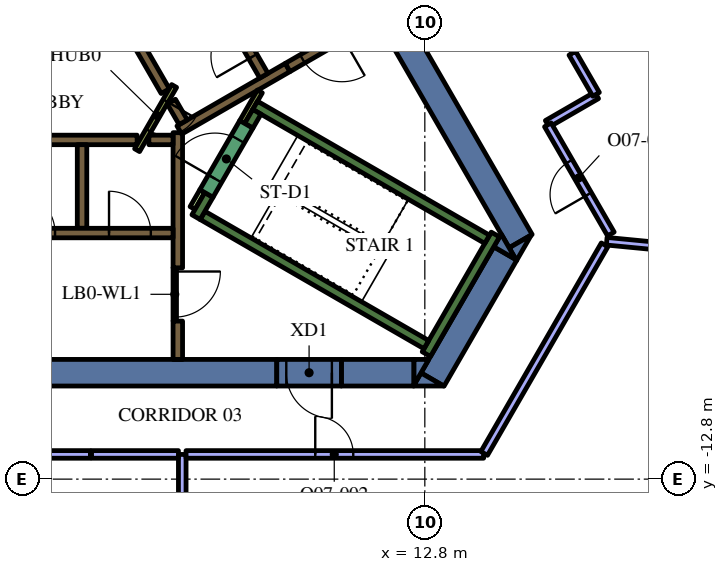
"""IFC4 building model, lengths in metres.
Left out: names, types, materials, properties, quantities, classifications, styles, units other than length and angle.
Written with IfcOpenShell. Run it as: python <this file> out.ifc"""

import sys

from ifc_helpers import new_model, si_unit, direction, frame, frame_2d, origin, place, context, subcontext, project, spatial, polyline, rectangle, outline, extrude, element, fill, save


model = new_model("IFC4")
c1 = context("Model", 3, precision=1e-05, world=origin(), true_north=direction((0.0, 1.0)))
c2 = subcontext(c1, "Body", "Model", "MODEL_VIEW")
j1 = project(units=[si_unit("LENGTHUNIT", "METRE"), si_unit("PLANEANGLEUNIT", "RADIAN")], contexts=[c1])
p1 = place(None, origin())
s1 = spatial("IfcSite", under=j1, at=p1, CompositionType="ELEMENT")
p2 = place(p1, origin())
s2 = spatial("IfcBuilding", under=s1, at=p2, CompositionType="ELEMENT")
p3 = place(p2, frame((0.0, 0.0, 218.4)))
s3 = spatial("IfcBuildingStorey", under=s2, at=p3, CompositionType="ELEMENT", Elevation=218.4)
p4 = place(p3, frame((9.085, 4.264, 0.0), z_axis=(0.0, 0.0, 1.0), x_axis=(0.499998082512, -0.866026510844, 0.0)))
e1 = element("IfcWall", 1, at=p4, inside=s3, PredefinedType="SOLIDWALL", context=c2, shape_type="SweptSolid", body=[
    extrude(rectangle(XDim=12.472, YDim=0.7, at=frame_2d((6.236, 0.0))), origin(), (0.0, 0.0, 1.0), 4.2),
])
p5 = place(p3, origin())
e2 = element("IfcWall", 2, at=p5, inside=s3, PredefinedType="SOLIDWALL", context=c2, shape_type="SweptSolid", body=[
    extrude(outline(polyline([(15.213, -7.05), (15.019, -6.714), (15.601, -6.378), (15.213, -7.05)])), origin(), (0.0, 0.0, 1.0), 4.2),
])
p6 = place(p3, frame((13.003, -10.179, 0.0), z_axis=(0.0, 0.0, 1.0), x_axis=(0.499972675833, 0.866041178825, 0.0)))
e3 = element("IfcWall", 3, at=p6, inside=s3, PredefinedType="SOLIDWALL", context=c2, shape_type="SweptSolid", body=[
    extrude(rectangle(XDim=3.829, YDim=0.7, at=frame_2d((1.915, 0.0))), origin(), (0.0, 0.0, 1.0), 4.2),
])
e4 = element("IfcWall", 4, at=p5, inside=s3, PredefinedType="SOLIDWALL", context=c2, shape_type="SweptSolid", body=[
    extrude(outline(polyline([(12.698, -10.005), (13.296, -10.35), (12.5, -10.35), (12.698, -10.005)])), origin(), (0.0, 0.0, 1.0), 4.2),
])
e5 = element("IfcWall", 5, at=p5, inside=s3, PredefinedType="SOLIDWALL", context=c2, shape_type="SweptSolid", body=[
    extrude(outline(polyline([(14.809, -6.35), (15.197, -7.022), (14.615, -6.686), (14.809, -6.35)])), origin(), (0.0, 0.0, 1.0), 4.2),
])
p7 = place(p3, frame((10.604, -10.0, 0.0), z_axis=(0.0, 0.0, 1.0), x_axis=(1.0, 0.0, 0.0)))
e6 = element("IfcWall", 6, at=p7, inside=s3, PredefinedType="SOLIDWALL", context=c2, shape_type="SweptSolid", body=[
    extrude(rectangle(XDim=1.909, YDim=0.7, at=frame_2d((0.955, 0.0))), origin(), (0.0, 0.0, 1.0), 4.2),
])
e7 = element("IfcWall", 7, at=p5, inside=s3, PredefinedType="SOLIDWALL", context=c2, shape_type="SweptSolid", body=[
    extrude(outline(polyline([(12.904, -9.65), (12.516, -10.322), (12.516, -9.65), (12.904, -9.65)])), origin(), (0.0, 0.0, 1.0), 4.2),
])
p8 = place(p3, frame((8.904, -10.0, 0.0), z_axis=(0.0, 0.0, 1.0), x_axis=(-1.0, 0.0, 0.0)))
e8 = element("IfcWall", 8, at=p8, inside=s3, PredefinedType="SOLIDWALL", context=c2, shape_type="SweptSolid", body=[
    extrude(rectangle(XDim=22.226, YDim=0.7, at=frame_2d((11.113, 0.0))), origin(), (0.0, 0.0, 1.0), 4.2),
])
p9 = place(p3, frame((12.84, -9.511, 0.0), z_axis=(0.0, 0.0, 1.0), x_axis=(0.500048121057, 0.865997619297, 0.0)))
e9 = element("IfcWall", 9, at=p9, inside=s3, PredefinedType="SOLIDWALL", context=c2, shape_type="SweptSolid", body=[
    extrude(rectangle(XDim=3.634, YDim=0.25, at=frame_2d((1.817, 0.0))), origin(), (0.0, 0.0, 1.0), 4.2),
])
p10 = place(p3, frame((12.84, -9.261, 0.0), z_axis=(0.0, 0.0, 1.0), x_axis=(-0.866013990052, 0.500019768644, 0.0)))
e10 = element("IfcWall", 10, at=p10, inside=s3, PredefinedType="SOLIDWALL", context=c2, shape_type="SweptSolid", body=[
    extrude(rectangle(XDim=6.8, YDim=0.25, at=frame_2d((3.4, 0.0))), origin(), (0.0, 0.0, 1.0), 4.2),
])
p11 = place(p3, frame((6.78, -5.906, 0.0), z_axis=(0.0, 0.0, 1.0), x_axis=(0.500223362819, 0.865896406789, 0.0)))
e11 = element("IfcWall", 11, at=p11, inside=s3, PredefinedType="SOLIDWALL", context=c2, shape_type="SweptSolid", body=[
    extrude(rectangle(XDim=0.675, YDim=0.25, at=frame_2d((0.337, 0.0))), origin(), (0.0, 0.0, 1.0), 4.2),
])
p12 = place(p3, frame((8.334, -2.964, 0.0), z_axis=(0.0, 0.0, 1.0), x_axis=(0.866016039709, -0.500016218704, 0.0)))
e12 = element("IfcWall", 12, at=p12, inside=s3, PredefinedType="SOLIDWALL", context=c2, shape_type="SweptSolid", body=[
    extrude(rectangle(XDim=7.05, YDim=0.25, at=frame_2d((3.525, 0.0))), origin(), (0.0, 0.0, 1.0), 4.2),
])
p13 = place(p3, frame((8.168, -3.503, 0.0), z_axis=(0.0, 0.0, 1.0), x_axis=(0.49972245349, 0.866185586049, 0.0)))
e13 = element("IfcWall", 13, at=p13, inside=s3, PredefinedType="SOLIDWALL", context=c2, shape_type="SweptSolid", body=[
    extrude(rectangle(XDim=0.425, YDim=0.25, at=frame_2d((0.212, 0.0))), origin(), (0.0, 0.0, 1.0), 4.2),
])
p14 = place(p3, frame((-5.259, -3.875, 0.0), z_axis=(0.0, 0.0, 1.0), x_axis=(1.0, 0.0, 0.0)))
e14 = element("IfcWall", 14, at=p14, inside=s3, PredefinedType="SOLIDWALL", context=c2, shape_type="SweptSolid", body=[
    extrude(rectangle(XDim=10.489, YDim=0.25, at=frame_2d((5.244, 0.0))), origin(), (0.0, 0.0, 1.0), 4.2),
])
p15 = place(p3, frame((3.78, -4.0, 0.0), z_axis=(0.0, 0.0, 1.0), x_axis=(0.0, -1.0, 0.0)))
e15 = element("IfcWall", 15, at=p15, inside=s3, PredefinedType="SOLIDWALL", context=c2, shape_type="SweptSolid", body=[
    extrude(rectangle(XDim=2.2, YDim=0.25, at=frame_2d((1.1, 0.0))), origin(), (0.0, 0.0, 1.0), 4.2),
])
p16 = place(p3, frame((6.3, -7.24, 0.0), z_axis=(0.0, 0.0, 1.0), x_axis=(0.0, 1.0, 0.0)))
e16 = element("IfcWall", 16, at=p16, inside=s3, PredefinedType="SOLIDWALL", context=c2, shape_type="SweptSolid", body=[
    extrude(rectangle(XDim=3.556, YDim=0.25, at=frame_2d((1.778, 0.0))), origin(), (0.0, 0.0, 1.0), 4.2),
])
p17 = place(p3, frame((6.3, -9.65, 0.0), z_axis=(0.0, 0.0, 1.0), x_axis=(0.0, 1.0, 0.0)))
e17 = element("IfcWall", 17, at=p17, inside=s3, PredefinedType="SOLIDWALL", context=c2, shape_type="SweptSolid", body=[
    extrude(rectangle(XDim=1.008, YDim=0.25, at=frame_2d((0.504, 0.0))), origin(), (0.0, 0.0, 1.0), 4.2),
])
p18 = place(p3, frame((5.538, -3.875, 0.0), z_axis=(0.0, 0.0, 1.0), x_axis=(1.0, 0.0, 0.0)))
e18 = element("IfcWall", 18, at=p18, inside=s3, PredefinedType="SOLIDWALL", context=c2, shape_type="SweptSolid", body=[
    extrude(rectangle(XDim=0.637, YDim=0.25, at=frame_2d((0.318, 0.0))), origin(), (0.0, 0.0, 1.0), 4.2),
])
p19 = place(p3, frame((9.19, -1.969, 0.0), z_axis=(0.0, 0.0, 1.0), x_axis=(-0.866057109641, -0.499945079824, 0.0)))
e19 = element("IfcWall", 19, at=p19, inside=s3, PredefinedType="SOLIDWALL", context=c2, shape_type="SweptSolid", body=[
    extrude(rectangle(XDim=3.291, YDim=0.25, at=frame_2d((1.646, 0.0))), origin(), (0.0, 0.0, 1.0), 4.2),
])
p20 = place(p3, frame((6.13, -2.867, 0.0), z_axis=(0.0, 0.0, 1.0), x_axis=(0.500160776593, -0.865932559475, 0.0)))
e20 = element("IfcWall", 20, at=p20, inside=s3, PredefinedType="SOLIDWALL", context=c2, shape_type="SweptSolid", body=[
    extrude(rectangle(XDim=0.627, YDim=0.25, at=frame_2d((0.313, 0.0))), origin(), (0.0, 0.0, 1.0), 4.2),
])
p21 = place(p3, frame((5.97, -2.591, 0.0), z_axis=(0.0, 0.0, 1.0), x_axis=(-0.499994469932, 0.866028596547, 0.0)))
e21 = element("IfcWall", 21, at=p21, inside=s3, PredefinedType="SOLIDWALL", context=c2, shape_type="SweptSolid", body=[
    extrude(rectangle(XDim=10.488, YDim=0.25, at=frame_2d((5.244, 0.0))), origin(), (0.0, 0.0, 1.0), 4.2),
])
p22 = place(p3, frame((6.945, -5.222, 0.0), z_axis=(0.0, 0.0, 1.0), x_axis=(-0.499818422106, -0.866130212453, 0.0)))
e22 = element("IfcWall", 22, at=p22, inside=s3, PredefinedType="PARTITIONING", context=c2, shape_type="SweptSolid", body=[
    extrude(rectangle(XDim=0.514, YDim=0.15, at=frame_2d((0.257, 0.0))), origin(), (0.0, 0.0, 1.0), 3.45),
])
p23 = place(p3, frame((8.459, -2.599, 0.0), z_axis=(0.0, 0.0, 1.0), x_axis=(-0.500041054325, -0.866001699761, 0.0)))
e23 = element("IfcWall", 23, at=p23, inside=s3, PredefinedType="PARTITIONING", context=c2, shape_type="SweptSolid", body=[
    extrude(rectangle(XDim=0.929, YDim=0.15, at=frame_2d((0.464, 0.0))), origin(), (0.0, 0.0, 1.0), 4.2),
])
p24 = place(p3, frame((-6.175, -6.325, 0.0), z_axis=(0.0, 0.0, 1.0), x_axis=(1.0, 0.0, 0.0)))
e24 = element("IfcWall", 24, at=p24, inside=s3, PredefinedType="SOLIDWALL", context=c2, shape_type="SweptSolid", body=[
    extrude(rectangle(XDim=12.35, YDim=0.25, at=frame_2d((6.175, 0.0))), origin(), (0.0, 0.0, 1.0), 4.2),
])
p25 = place(p24, frame((0.585, 0.0, 0.0)))
e25 = element("IfcOpeningElement", 25, at=p25, cuts=e24, PredefinedType="OPENING", context=c2, shape_type="SweptSolid", body=[
    extrude(rectangle(XDim=1.1, YDim=2.1, at=frame_2d((0.55, 1.05))), frame((0.0, 0.135, 0.0), z_axis=(0.0, -1.0, 0.0), x_axis=(1.0, 0.0, 0.0)), (0.0, 0.0, 1.0), 0.27),
])
p26 = place(p24, frame((3.105, 0.0, 0.0)))
e26 = element("IfcOpeningElement", 26, at=p26, cuts=e24, PredefinedType="OPENING", context=c2, shape_type="SweptSolid", body=[
    extrude(rectangle(XDim=1.1, YDim=2.1, at=frame_2d((0.55, 1.05))), frame((0.0, 0.135, 0.0), z_axis=(0.0, -1.0, 0.0), x_axis=(1.0, 0.0, 0.0)), (0.0, 0.0, 1.0), 0.27),
])
p27 = place(p24, frame((5.625, 0.0, 0.0)))
e27 = element("IfcOpeningElement", 27, at=p27, cuts=e24, PredefinedType="OPENING", context=c2, shape_type="SweptSolid", body=[
    extrude(rectangle(XDim=1.1, YDim=2.1, at=frame_2d((0.55, 1.05))), frame((0.0, 0.135, 0.0), z_axis=(0.0, -1.0, 0.0), x_axis=(1.0, 0.0, 0.0)), (0.0, 0.0, 1.0), 0.27),
])
p28 = place(p24, frame((8.145, 0.0, 0.0)))
e28 = element("IfcOpeningElement", 28, at=p28, cuts=e24, PredefinedType="OPENING", context=c2, shape_type="SweptSolid", body=[
    extrude(rectangle(XDim=1.1, YDim=2.1, at=frame_2d((0.55, 1.05))), frame((0.0, 0.135, 0.0), z_axis=(0.0, -1.0, 0.0), x_axis=(1.0, 0.0, 0.0)), (0.0, 0.0, 1.0), 0.27),
])
p29 = place(p24, frame((10.665, 0.0, 0.0)))
e29 = element("IfcOpeningElement", 29, at=p29, cuts=e24, PredefinedType="OPENING", context=c2, shape_type="SweptSolid", body=[
    extrude(rectangle(XDim=1.1, YDim=2.1, at=frame_2d((0.55, 1.05))), frame((0.0, 0.135, 0.0), z_axis=(0.0, -1.0, 0.0), x_axis=(1.0, 0.0, 0.0)), (0.0, 0.0, 1.0), 0.27),
])
p30 = place(p3, frame((8.565, -2.185, 0.0), z_axis=(0.0, 0.0, 1.0), x_axis=(-0.499997954832, 0.866026584559, 0.0)))
e30 = element("IfcWall", 30, at=p30, inside=s3, PredefinedType="SOLIDWALL", context=c2, shape_type="SweptSolid", body=[
    extrude(rectangle(XDim=12.35, YDim=0.25, at=frame_2d((6.175, 0.0))), origin(), (0.0, 0.0, 1.0), 4.2),
])
p31 = place(p30, frame((0.585, 0.0, 0.0)))
e31 = element("IfcOpeningElement", 31, at=p31, cuts=e30, PredefinedType="OPENING", context=c2, shape_type="SweptSolid", body=[
    extrude(rectangle(XDim=1.1, YDim=2.1, at=frame_2d((0.55, 1.05))), frame((0.0, 0.135, 0.0), z_axis=(0.0, -1.0, 0.0), x_axis=(1.0, 0.0, 0.0)), (0.0, 0.0, 1.0), 0.27),
])
p32 = place(p3, frame((7.053, -5.284, 0.0), z_axis=(0.0, 0.0, 1.0), x_axis=(0.500078061341, 0.865980330357, 0.0)))
e32 = element("IfcWall", 32, at=p32, inside=s3, PredefinedType="SOLIDWALL", context=c2, shape_type="SweptSolid", body=[
    extrude(rectangle(XDim=2.1, YDim=0.4, at=frame_2d((1.05, 0.0))), origin(), (0.0, 0.0, 1.0), 4.2),
])
p33 = place(p32, frame((0.45, 0.0, 0.0)))
e33 = element("IfcOpeningElement", 33, at=p33, cuts=e32, PredefinedType="OPENING", context=c2, shape_type="SweptSolid", body=[
    extrude(rectangle(XDim=1.2, YDim=2.1, at=frame_2d((0.6, 1.05))), frame((0.0, 0.21, 0.0), z_axis=(0.0, -1.0, 0.0), x_axis=(1.0, 0.0, 0.0)), (0.0, 0.0, 1.0), 0.42),
])
p34 = place(p3, frame((6.203, -2.456, 0.0), z_axis=(0.0, 0.0, 1.0), x_axis=(-0.500043961785, -0.866000020948, 0.0)))
e34 = element("IfcWall", 34, at=p34, inside=s3, PredefinedType="PARTITIONING", context=c2, shape_type="SweptSolid", body=[
    extrude(rectangle(XDim=1.95, YDim=0.15, at=frame_2d((0.975, 0.0))), origin(), (0.0, 0.0, 1.0), 4.2),
])
p35 = place(p34, frame((0.45, 0.0, 0.0)))
e35 = element("IfcOpeningElement", 35, at=p35, cuts=e34, PredefinedType="OPENING", context=c2, shape_type="SweptSolid", body=[
    extrude(rectangle(XDim=0.9, YDim=2.1, at=frame_2d((0.45, 1.05))), frame((0.0, 0.085, 0.0), z_axis=(0.0, -1.0, 0.0), x_axis=(1.0, 0.0, 0.0)), (0.0, 0.0, 1.0), 0.17),
])
p36 = place(p3, frame((6.22, -7.237, 0.0), z_axis=(0.0, 0.0, 1.0), x_axis=(0.0, -1.0, 0.0)))
e36 = element("IfcWall", 36, at=p36, inside=s3, PredefinedType="PARTITIONING", context=c2, shape_type="SweptSolid", body=[
    extrude(rectangle(XDim=1.4, YDim=0.09, at=frame_2d((0.7, 0.0))), origin(), (0.0, 0.0, 1.0), 3.45),
])
p37 = place(p36, frame((0.1, 0.0, 0.0)))
e37 = element("IfcOpeningElement", 37, at=p37, cuts=e36, PredefinedType="OPENING", context=c2, shape_type="SweptSolid", body=[
    extrude(rectangle(XDim=1.2, YDim=2.1, at=frame_2d((0.6, 1.05))), frame((0.0, 0.055, 0.0), z_axis=(0.0, -1.0, 0.0), x_axis=(1.0, 0.0, 0.0)), (0.0, 0.0, 1.0), 0.11),
])
p38 = place(p3, frame((11.009, -0.919, 0.0), z_axis=(0.0, 0.0, 1.0), x_axis=(-0.866059744384, -0.49994051562, 0.0)))
e38 = element("IfcWall", 38, at=p38, inside=s3, PredefinedType="SOLIDWALL", context=c2, shape_type="SweptSolid", body=[
    extrude(rectangle(XDim=2.1, YDim=0.25, at=frame_2d((1.05, 0.0))), origin(), (0.0, 0.0, 1.0), 4.2),
])
p39 = place(p38, frame((0.45, 0.0, 0.0)))
e39 = element("IfcOpeningElement", 39, at=p39, cuts=e38, PredefinedType="OPENING", context=c2, shape_type="SweptSolid", body=[
    extrude(rectangle(XDim=1.2, YDim=2.1, at=frame_2d((0.6, 1.05))), frame((0.0, 0.135, 0.0), z_axis=(0.0, -1.0, 0.0), x_axis=(1.0, 0.0, 0.0)), (0.0, 0.0, 1.0), 0.27),
])
p40 = place(p3, frame((10.604, -10.0, 0.0), z_axis=(0.0, 0.0, 1.0), x_axis=(-1.0, 0.0, 0.0)))
e40 = element("IfcWall", 40, at=p40, inside=s3, PredefinedType="SOLIDWALL", context=c2, shape_type="SweptSolid", body=[
    extrude(rectangle(XDim=1.7, YDim=0.7, at=frame_2d((0.85, 0.0))), origin(), (0.0, 0.0, 1.0), 4.2),
])
p41 = place(p40, frame((0.25, 0.0, 0.0)))
e41 = element("IfcOpeningElement", 41, at=p41, cuts=e40, PredefinedType="OPENING", context=c2, shape_type="SweptSolid", body=[
    extrude(rectangle(XDim=1.2, YDim=2.1, at=frame_2d((0.6, 1.05))), frame((0.0, 0.36, 0.0), z_axis=(0.0, -1.0, 0.0), x_axis=(1.0, 0.0, 0.0)), (0.0, 0.0, 1.0), 0.72),
])
p42 = place(p3, frame((6.417, -12.15, 0.0), z_axis=(0.0, 0.0, 1.0), x_axis=(0.0, -1.0, 0.0)))
e42 = element("IfcWall", 42, at=p42, inside=s3, PredefinedType="PARTITIONING", context=c2, shape_type="SweptSolid", body=[
    extrude(rectangle(XDim=6.747, YDim=0.2, at=frame_2d((3.374, 0.0))), origin(), (0.0, 0.0, 1.0), 3.45),
])
p43 = place(p3, frame((-3.108, -12.15, 0.0), z_axis=(0.0, 0.0, 1.0), x_axis=(1.0, 0.0, 0.0)))
e43 = element("IfcWall", 43, at=p43, inside=s3, PredefinedType="PARTITIONING", context=c2, shape_type="SweptSolid", body=[
    extrude(rectangle(XDim=7.108, YDim=0.2, at=frame_2d((3.554, 0.0))), origin(), (0.0, 0.0, 1.0), 3.45),
])
p44 = place(p43, frame((3.1, 0.0, 0.0)))
e44 = element("IfcOpeningElement", 44, at=p44, cuts=e43, PredefinedType="OPENING", context=c2, shape_type="SweptSolid", body=[
    extrude(rectangle(XDim=1.0, YDim=2.1, at=frame_2d((0.5, 1.05))), frame((0.0, 0.11, 0.0), z_axis=(0.0, -1.0, 0.0), x_axis=(1.0, 0.0, 0.0)), (0.0, 0.0, 1.0), 0.22),
])
p45 = place(p3, frame((4.03, -12.15, 0.0), z_axis=(0.0, 0.0, 1.0), x_axis=(1.0, 0.0, 0.0)))
e45 = element("IfcWall", 45, at=p45, inside=s3, PredefinedType="PARTITIONING", context=c2, shape_type="SweptSolid", body=[
    extrude(rectangle(XDim=2.287, YDim=0.2, at=frame_2d((1.144, 0.0))), origin(), (0.0, 0.0, 1.0), 3.45),
])
p46 = place(p3, frame((17.586, -6.54, 0.0), z_axis=(0.0, 0.0, 1.0), x_axis=(0.995357542522, -0.096246363795, 0.0)))
e46 = element("IfcWall", 46, at=p46, inside=s3, PredefinedType="PARTITIONING", context=c2, shape_type="SweptSolid", body=[
    extrude(rectangle(XDim=7.318, YDim=0.2, at=frame_2d((3.659, 0.0))), origin(), (0.0, 0.0, 1.0), 3.45),
])
p47 = place(p3, frame((6.517, -12.15, 0.0), z_axis=(0.0, 0.0, 1.0), x_axis=(1.0, 0.0, 0.0)))
e47 = element("IfcWall", 47, at=p47, inside=s3, PredefinedType="PARTITIONING", context=c2, shape_type="SweptSolid", body=[
    extrude(rectangle(XDim=7.83, YDim=0.2, at=frame_2d((3.915, 0.0))), origin(), (0.0, 0.0, 1.0), 3.45),
])
p48 = place(p47, frame((3.4, 0.0, 0.0)))
e48 = element("IfcOpeningElement", 48, at=p48, cuts=e47, PredefinedType="OPENING", context=c2, shape_type="SweptSolid", body=[
    extrude(rectangle(XDim=1.0, YDim=2.1, at=frame_2d((0.5, 1.05))), frame((0.0, 0.11, 0.0), z_axis=(0.0, -1.0, 0.0), x_axis=(1.0, 0.0, 0.0)), (0.0, 0.0, 1.0), 0.22),
])
p49 = place(p3, frame((14.362, -12.124, 0.0), z_axis=(0.0, 0.0, 1.0), x_axis=(0.500017005442, 0.866015585465, 0.0)))
e49 = element("IfcWall", 49, at=p49, inside=s3, PredefinedType="PARTITIONING", context=c2, shape_type="SweptSolid", body=[
    extrude(rectangle(XDim=6.338, YDim=0.2, at=frame_2d((3.169, 0.0))), origin(), (0.0, 0.0, 1.0), 3.45),
])
p50 = place(p3, frame((16.631, -1.506, 0.0), z_axis=(0.0, 0.0, 1.0), x_axis=(0.866045655253, 0.499964921787, 0.0)))
e50 = element("IfcWall", 50, at=p50, inside=s3, PredefinedType="PARTITIONING", context=c2, shape_type="SweptSolid", body=[
    extrude(rectangle(XDim=5.607, YDim=0.2, at=frame_2d((2.804, 0.0))), origin(), (0.0, 0.0, 1.0), 3.45),
])
p51 = place(p3, frame((16.022, -3.451, 0.0), z_axis=(0.0, 0.0, 1.0), x_axis=(0.866031096941, 0.499990139034, 0.0)))
e51 = element("IfcWall", 51, at=p51, inside=s3, PredefinedType="PARTITIONING", context=c2, shape_type="SweptSolid", body=[
    extrude(rectangle(XDim=1.5, YDim=0.2, at=frame_2d((0.75, 0.0))), origin(), (0.0, 0.0, 1.0), 3.45),
])
p52 = place(p3, frame((17.306, -2.675, 0.0), z_axis=(0.0, 0.0, 1.0), x_axis=(-0.499919672301, 0.866071776036, 0.0)))
e52 = element("IfcWall", 52, at=p52, inside=s3, PredefinedType="PARTITIONING", context=c2, shape_type="SweptSolid", body=[
    extrude(rectangle(XDim=1.25, YDim=0.2, at=frame_2d((0.625, 0.0))), origin(), (0.0, 0.0, 1.0), 3.45),
])
p53 = place(p3, frame((17.696, -6.35, 0.0), z_axis=(0.0, 0.0, 1.0), x_axis=(-0.500017629075, 0.866015225394, 0.0)))
e53 = element("IfcWall", 53, at=p53, inside=s3, PredefinedType="PARTITIONING", context=c2, shape_type="SweptSolid", body=[
    extrude(rectangle(XDim=3.317, YDim=0.2, at=frame_2d((1.659, 0.0))), origin(), (0.0, 0.0, 1.0), 3.45),
])
p54 = place(p53, frame((1.2, 0.0, 0.0)))
e54 = element("IfcOpeningElement", 54, at=p54, cuts=e53, PredefinedType="OPENING", context=c2, shape_type="SweptSolid", body=[
    extrude(rectangle(XDim=1.0, YDim=2.1, at=frame_2d((0.5, 1.05))), frame((0.0, 0.11, 0.0), z_axis=(0.0, -1.0, 0.0), x_axis=(1.0, 0.0, 0.0)), (0.0, 0.0, 1.0), 0.22),
])
p55 = place(p28, origin())
e55 = element("IfcDoor", 55, at=p55, inside=s3, OperationType="DOUBLE_DOOR_SLIDING", PredefinedType="DOOR", context=c2, shape_type="SweptSolid", body=[
    extrude(rectangle(XDim=1.1, YDim=2.1, at=frame_2d((0.55, 1.05))), frame((0.0, 0.025, 0.0), z_axis=(0.0, -1.0, 0.0), x_axis=(1.0, 0.0, 0.0)), (0.0, 0.0, 1.0), 0.05),
])
fill(e28, e55)
p56 = place(p29, origin())
e56 = element("IfcDoor", 56, at=p56, inside=s3, OperationType="DOUBLE_DOOR_SLIDING", PredefinedType="DOOR", context=c2, shape_type="SweptSolid", body=[
    extrude(rectangle(XDim=1.1, YDim=2.1, at=frame_2d((0.55, 1.05))), frame((0.0, 0.025, 0.0), z_axis=(0.0, -1.0, 0.0), x_axis=(1.0, 0.0, 0.0)), (0.0, 0.0, 1.0), 0.05),
])
fill(e29, e56)
p57 = place(p31, origin())
e57 = element("IfcDoor", 57, at=p57, inside=s3, OperationType="DOUBLE_DOOR_SLIDING", PredefinedType="DOOR", context=c2, shape_type="SweptSolid", body=[
    extrude(rectangle(XDim=1.1, YDim=2.1, at=frame_2d((0.55, 1.05))), frame((0.0, 0.025, 0.0), z_axis=(0.0, -1.0, 0.0), x_axis=(1.0, 0.0, 0.0)), (0.0, 0.0, 1.0), 0.05),
])
fill(e31, e57)
p58 = place(p33, origin())
e58 = element("IfcDoor", 58, at=p58, inside=s3, OperationType="SINGLE_SWING_LEFT", PredefinedType="DOOR", context=c2, shape_type="SweptSolid", body=[
    extrude(rectangle(XDim=1.2, YDim=2.1, at=frame_2d((0.6, 1.05))), frame((0.0, 0.025, 0.0), z_axis=(0.0, -1.0, 0.0), x_axis=(1.0, 0.0, 0.0)), (0.0, 0.0, 1.0), 0.05),
])
fill(e33, e58)
p59 = place(p35, origin())
e59 = element("IfcDoor", 59, at=p59, inside=s3, OperationType="SINGLE_SWING_LEFT", PredefinedType="DOOR", context=c2, shape_type="SweptSolid", body=[
    extrude(rectangle(XDim=0.9, YDim=2.1, at=frame_2d((0.45, 1.05))), frame((0.0, 0.025, 0.0), z_axis=(0.0, -1.0, 0.0), x_axis=(1.0, 0.0, 0.0)), (0.0, 0.0, 1.0), 0.05),
])
fill(e35, e59)
p60 = place(p37, origin())
e60 = element("IfcDoor", 60, at=p60, inside=s3, OperationType="SINGLE_SWING_LEFT", PredefinedType="DOOR", context=c2, shape_type="SweptSolid", body=[
    extrude(rectangle(XDim=1.2, YDim=2.1, at=frame_2d((0.6, 1.05))), frame((0.0, 0.025, 0.0), z_axis=(0.0, -1.0, 0.0), x_axis=(1.0, 0.0, 0.0)), (0.0, 0.0, 1.0), 0.05),
])
fill(e37, e60)
p61 = place(p39, origin())
e61 = element("IfcDoor", 61, at=p61, inside=s3, OperationType="SINGLE_SWING_LEFT", PredefinedType="DOOR", context=c2, shape_type="SweptSolid", body=[
    extrude(rectangle(XDim=1.2, YDim=2.1, at=frame_2d((0.6, 1.05))), frame((0.0, 0.025, 0.0), z_axis=(0.0, -1.0, 0.0), x_axis=(1.0, 0.0, 0.0)), (0.0, 0.0, 1.0), 0.05),
])
fill(e39, e61)
p62 = place(p41, origin())
e62 = element("IfcDoor", 62, at=p62, inside=s3, OperationType="SINGLE_SWING_LEFT", PredefinedType="DOOR", context=c2, shape_type="SweptSolid", body=[
    extrude(rectangle(XDim=1.2, YDim=2.1, at=frame_2d((0.6, 1.05))), frame((0.0, 0.025, 0.0), z_axis=(0.0, -1.0, 0.0), x_axis=(1.0, 0.0, 0.0)), (0.0, 0.0, 1.0), 0.05),
])
fill(e41, e62)
p63 = place(p48, origin())
e63 = element("IfcDoor", 63, at=p63, inside=s3, OperationType="SINGLE_SWING_LEFT", PredefinedType="DOOR", context=c2, shape_type="SweptSolid", body=[
    extrude(rectangle(XDim=1.0, YDim=2.1, at=frame_2d((0.5, 1.05))), frame((0.0, 0.025, 0.0), z_axis=(0.0, -1.0, 0.0), x_axis=(1.0, 0.0, 0.0)), (0.0, 0.0, 1.0), 0.05),
])
fill(e48, e63)
p64 = place(p54, origin())
e64 = element("IfcDoor", 64, at=p64, inside=s3, OperationType="SINGLE_SWING_RIGHT", PredefinedType="DOOR", context=c2, shape_type="SweptSolid", body=[
    extrude(rectangle(XDim=1.0, YDim=2.1, at=frame_2d((0.5, 1.05))), frame((0.0, 0.025, 0.0), z_axis=(0.0, -1.0, 0.0), x_axis=(1.0, 0.0, 0.0)), (0.0, 0.0, 1.0), 0.05),
])
fill(e54, e64)
save(model, sys.argv[1])
